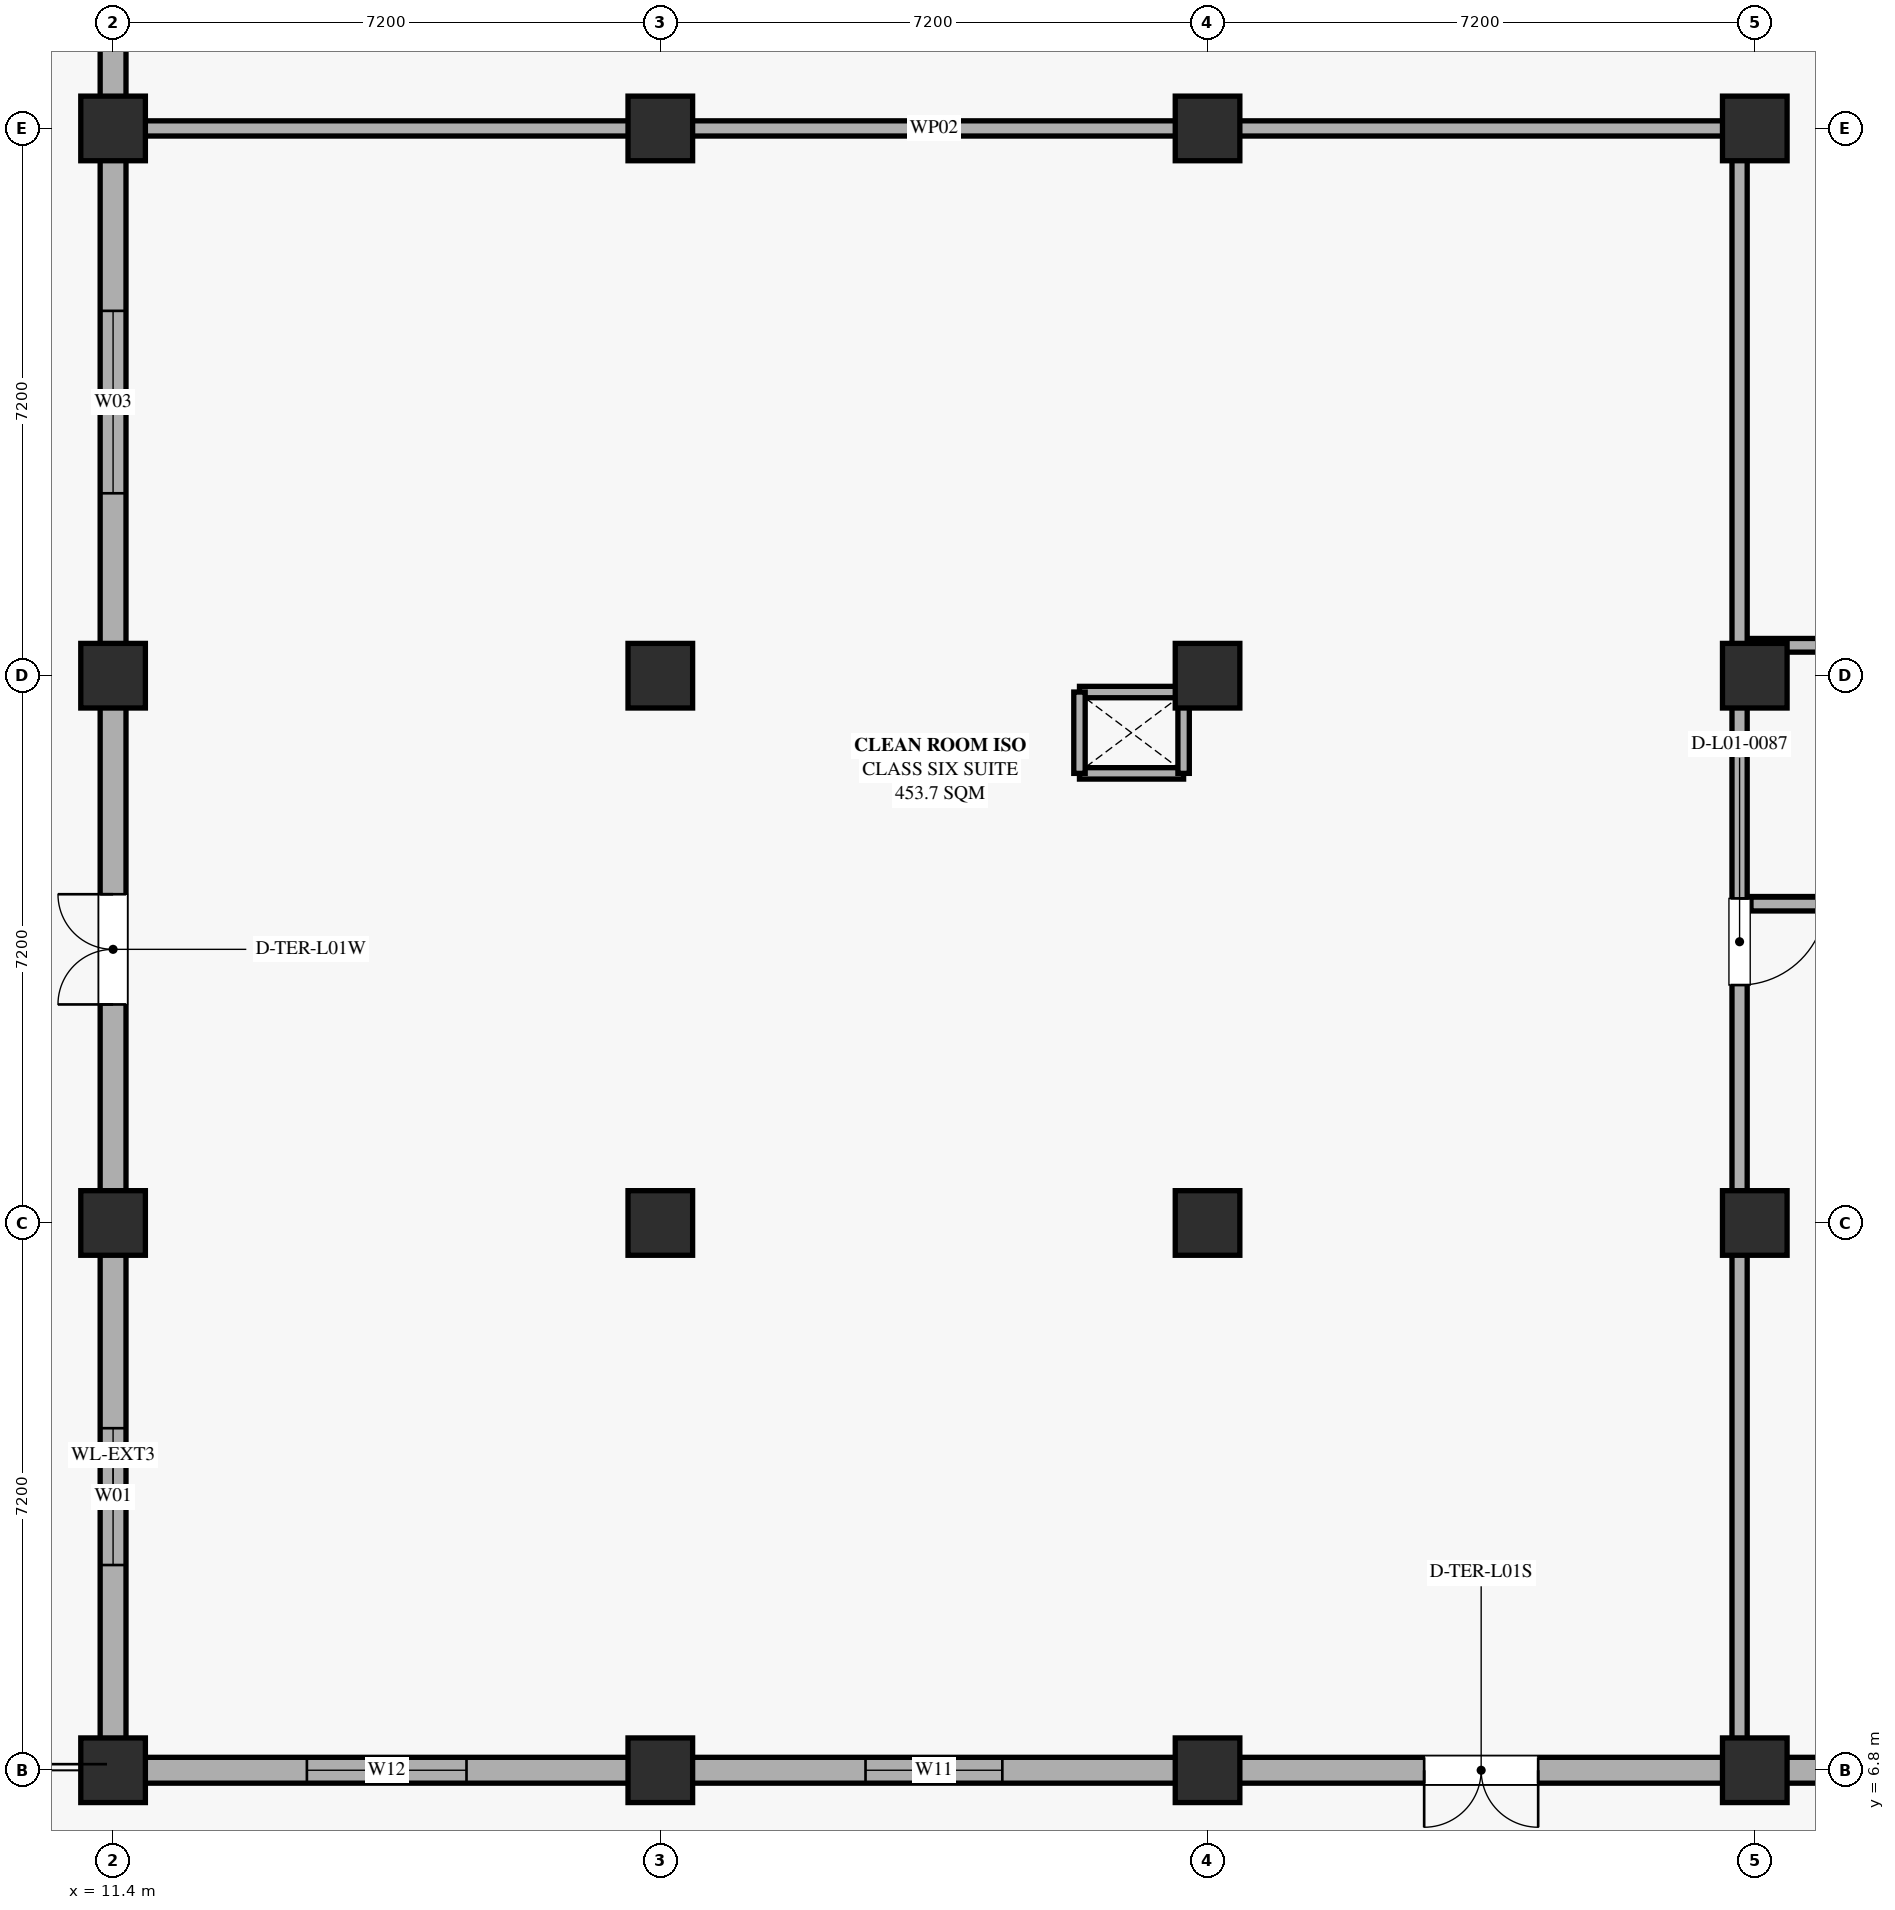
"""IFC4 building model, lengths in metres.
Left out: names, types, materials, properties, quantities, classifications, styles, units other than length and angle.
Written with IfcOpenShell. Run it as: python <this file> out.ifc"""

import sys

from ifc_helpers import new_model, si_unit, direction, frame, frame_2d, origin, origin_2d, place, context, subcontext, project, spatial, rectangle, extrude, element, fill, save


model = new_model("IFC4")
c1 = context("Model", 3, precision=1e-05, world=origin(), true_north=direction((0.0, 1.0)))
c2 = subcontext(c1, "Body", "Model", "MODEL_VIEW")
j1 = project(units=[si_unit("LENGTHUNIT", "METRE"), si_unit("PLANEANGLEUNIT", "RADIAN")], contexts=[c1])
p1 = place(None, origin())
s1 = spatial("IfcSite", under=j1, at=p1, CompositionType="ELEMENT")
p2 = place(p1, origin())
s2 = spatial("IfcBuilding", under=s1, at=p2, CompositionType="ELEMENT")
p3 = place(p2, frame((0.0, 0.0, 5.4)))
s3 = spatial("IfcBuildingStorey", under=s2, at=p3, CompositionType="ELEMENT", Elevation=5.4)
for number, where, z_axis, x_axis in (
    (1, (11.4, 6.8, 0.0), (0.0, 0.0, 1.0), (1.0, 0.0, 0.0)),
    (2, (18.6, 6.8, 0.0), (0.0, 0.0, 1.0), (1.0, 0.0, 0.0)),
    (3, (25.8, 6.8, 0.0), (0.0, 0.0, 1.0), (1.0, 0.0, 0.0)),
    (4, (33.0, 6.8, 0.0), (0.0, 0.0, 1.0), (1.0, 0.0, 0.0)),
    (5, (11.4, 14.0, 0.0), (0.0, 0.0, 1.0), (1.0, 0.0, 0.0)),
    (6, (18.6, 14.0, 0.0), (0.0, 0.0, 1.0), (1.0, 0.0, 0.0)),
    (7, (25.8, 14.0, 0.0), (0.0, 0.0, 1.0), (1.0, 0.0, 0.0)),
    (8, (33.0, 14.0, 0.0), (0.0, 0.0, 1.0), (1.0, 0.0, 0.0)),
    (9, (11.4, 21.2, 0.0), (0.0, 0.0, 1.0), (1.0, 0.0, 0.0)),
    (10, (18.6, 21.2, 0.0), (0.0, 0.0, 1.0), (1.0, 0.0, 0.0)),
    (11, (25.8, 21.2, 0.0), (0.0, 0.0, 1.0), (1.0, 0.0, 0.0)),
    (12, (33.0, 21.2, 0.0), (0.0, 0.0, 1.0), (1.0, 0.0, 0.0)),
    (13, (11.4, 28.4, 0.0), (0.0, 0.0, 1.0), (1.0, 0.0, 0.0)),
    (14, (18.6, 28.4, 0.0), (0.0, 0.0, 1.0), (1.0, 0.0, 0.0)),
    (15, (25.8, 28.4, 0.0), (0.0, 0.0, 1.0), (1.0, 0.0, 0.0)),
    (16, (33.0, 28.4, 0.0), (0.0, 0.0, 1.0), (1.0, 0.0, 0.0)),
):
    element("IfcColumn", number, at=place(p3, frame(where, z_axis=z_axis, x_axis=x_axis)), inside=s3, PredefinedType="COLUMN", context=c2, shape_type="SweptSolid", body=[
        extrude(rectangle(XDim=0.85, YDim=0.85, at=origin_2d()), origin(), (0.0, 0.0, 1.0), 5.04),
    ])
p4 = place(p3, frame((11.4, 7.21, 0.0), z_axis=(0.0, 0.0, 1.0), x_axis=(0.0, 1.0, 0.0)))
e17 = element("IfcWall", 17, at=p4, inside=s3, PredefinedType="SOLIDWALL", context=c2, shape_type="SweptSolid", body=[
    extrude(rectangle(XDim=6.38, YDim=0.34, at=frame_2d((3.19, 0.0))), origin(), (0.0, 0.0, 1.0), 3.54),
])
p5 = place(p4, frame((2.29, 0.0, 0.9)))
e18 = element("IfcOpeningElement", 18, at=p5, cuts=e17, PredefinedType="OPENING", context=c2, shape_type="SweptSolid", body=[
    extrude(rectangle(XDim=1.8, YDim=2.4, at=frame_2d((0.9, 1.2))), frame((0.0, 0.18, 0.0), z_axis=(0.0, -1.0, 0.0), x_axis=(1.0, 0.0, 0.0)), (0.0, 0.0, 1.0), 0.36),
])
p6 = place(p3, frame((11.4, 14.41, 0.0), z_axis=(0.0, 0.0, 1.0), x_axis=(0.0, 1.0, 0.0)))
e19 = element("IfcWall", 19, at=p6, inside=s3, PredefinedType="SOLIDWALL", context=c2, shape_type="SweptSolid", body=[
    extrude(rectangle(XDim=6.38, YDim=0.34, at=frame_2d((3.19, 0.0))), origin(), (0.0, 0.0, 1.0), 3.54),
])
p7 = place(p6, frame((2.465, 0.0, 0.0)))
e20 = element("IfcOpeningElement", 20, at=p7, cuts=e19, PredefinedType="OPENING", context=c2, shape_type="SweptSolid", body=[
    extrude(rectangle(XDim=1.45, YDim=2.2, at=frame_2d((0.725, 1.1))), frame((0.0, 0.18, 0.0), z_axis=(0.0, -1.0, 0.0), x_axis=(1.0, 0.0, 0.0)), (0.0, 0.0, 1.0), 0.36),
])
p8 = place(p3, frame((11.4, 21.61, 0.0), z_axis=(0.0, 0.0, 1.0), x_axis=(0.0, 1.0, 0.0)))
e21 = element("IfcWall", 21, at=p8, inside=s3, PredefinedType="SOLIDWALL", context=c2, shape_type="SweptSolid", body=[
    extrude(rectangle(XDim=6.38, YDim=0.34, at=frame_2d((3.19, 0.0))), origin(), (0.0, 0.0, 1.0), 3.54),
])
p9 = place(p8, frame((1.99, 0.0, 0.9)))
e22 = element("IfcOpeningElement", 22, at=p9, cuts=e21, PredefinedType="OPENING", context=c2, shape_type="SweptSolid", body=[
    extrude(rectangle(XDim=2.4, YDim=2.4, at=frame_2d((1.2, 1.2))), frame((0.0, 0.18, 0.0), z_axis=(0.0, -1.0, 0.0), x_axis=(1.0, 0.0, 0.0)), (0.0, 0.0, 1.0), 0.36),
])
p10 = place(p3, frame((11.4, 28.81, 0.0), z_axis=(0.0, 0.0, 1.0), x_axis=(0.0, 1.0, 0.0)))
e23 = element("IfcWall", 23, at=p10, inside=s3, PredefinedType="SOLIDWALL", context=c2, shape_type="SweptSolid", body=[
    extrude(rectangle(XDim=6.38, YDim=0.34, at=frame_2d((3.19, 0.0))), origin(), (0.0, 0.0, 1.0), 3.54),
])
p11 = place(p10, frame((2.44, 0.0, 0.9)))
e24 = element("IfcOpeningElement", 24, at=p11, cuts=e23, PredefinedType="OPENING", context=c2, shape_type="SweptSolid", body=[
    extrude(rectangle(XDim=1.5, YDim=2.4, at=frame_2d((0.75, 1.2))), frame((0.0, 0.18, 0.0), z_axis=(0.0, -1.0, 0.0), x_axis=(1.0, 0.0, 0.0)), (0.0, 0.0, 1.0), 0.36),
])
p12 = place(p3, frame((39.79, 6.8, 0.0), z_axis=(0.0, 0.0, 1.0), x_axis=(-1.0, 0.0, 0.0)))
e25 = element("IfcWall", 25, at=p12, inside=s3, PredefinedType="SOLIDWALL", context=c2, shape_type="SweptSolid", body=[
    extrude(rectangle(XDim=6.38, YDim=0.34, at=frame_2d((3.19, 0.0))), origin(), (0.0, 0.0, 1.0), 3.54),
])
p13 = place(p12, frame((2.44, 0.0, 0.9)))
e26 = element("IfcOpeningElement", 26, at=p13, cuts=e25, PredefinedType="OPENING", context=c2, shape_type="SweptSolid", body=[
    extrude(rectangle(XDim=1.5, YDim=2.1, at=frame_2d((0.75, 1.05))), frame((0.0, 0.18, 0.0), z_axis=(0.0, -1.0, 0.0), x_axis=(1.0, 0.0, 0.0)), (0.0, 0.0, 1.0), 0.36),
])
p14 = place(p3, frame((32.59, 6.8, 0.0), z_axis=(0.0, 0.0, 1.0), x_axis=(-1.0, 0.0, 0.0)))
e27 = element("IfcWall", 27, at=p14, inside=s3, PredefinedType="SOLIDWALL", context=c2, shape_type="SweptSolid", body=[
    extrude(rectangle(XDim=6.38, YDim=0.34, at=frame_2d((3.19, 0.0))), origin(), (0.0, 0.0, 1.0), 3.54),
])
p15 = place(p14, frame((2.44, 0.0, 0.0)))
e28 = element("IfcOpeningElement", 28, at=p15, cuts=e27, PredefinedType="OPENING", context=c2, shape_type="SweptSolid", body=[
    extrude(rectangle(XDim=1.5, YDim=2.2, at=frame_2d((0.75, 1.1))), frame((0.0, 0.18, 0.0), z_axis=(0.0, -1.0, 0.0), x_axis=(1.0, 0.0, 0.0)), (0.0, 0.0, 1.0), 0.36),
])
p16 = place(p3, frame((25.39, 6.8, 0.0), z_axis=(0.0, 0.0, 1.0), x_axis=(-1.0, 0.0, 0.0)))
e29 = element("IfcWall", 29, at=p16, inside=s3, PredefinedType="SOLIDWALL", context=c2, shape_type="SweptSolid", body=[
    extrude(rectangle(XDim=6.38, YDim=0.34, at=frame_2d((3.19, 0.0))), origin(), (0.0, 0.0, 1.0), 3.54),
])
p17 = place(p16, frame((2.29, 0.0, 0.9)))
e30 = element("IfcOpeningElement", 30, at=p17, cuts=e29, PredefinedType="OPENING", context=c2, shape_type="SweptSolid", body=[
    extrude(rectangle(XDim=1.8, YDim=1.8, at=frame_2d((0.9, 0.9))), frame((0.0, 0.18, 0.0), z_axis=(0.0, -1.0, 0.0), x_axis=(1.0, 0.0, 0.0)), (0.0, 0.0, 1.0), 0.36),
])
p18 = place(p3, frame((18.19, 6.8, 0.0), z_axis=(0.0, 0.0, 1.0), x_axis=(-1.0, 0.0, 0.0)))
e31 = element("IfcWall", 31, at=p18, inside=s3, PredefinedType="SOLIDWALL", context=c2, shape_type="SweptSolid", body=[
    extrude(rectangle(XDim=6.38, YDim=0.34, at=frame_2d((3.19, 0.0))), origin(), (0.0, 0.0, 1.0), 3.54),
])
p19 = place(p18, frame((2.14, 0.0, 0.9)))
e32 = element("IfcOpeningElement", 32, at=p19, cuts=e31, PredefinedType="OPENING", context=c2, shape_type="SweptSolid", body=[
    extrude(rectangle(XDim=2.1, YDim=1.8, at=frame_2d((1.05, 0.9))), frame((0.0, 0.18, 0.0), z_axis=(0.0, -1.0, 0.0), x_axis=(1.0, 0.0, 0.0)), (0.0, 0.0, 1.0), 0.36),
])
for number, where, z_axis, x_axis in (
    (33, (25.485, 19.915, 0.0), (0.0, 0.0, 1.0), (-1.0, 0.0, 0.0)),
    (34, (24.115, 20.985, 0.0), (0.0, 0.0, 1.0), (1.0, 0.0, 0.0)),
):
    element("IfcWall", number, at=place(p3, frame(where, z_axis=z_axis, x_axis=x_axis)), inside=s3, PredefinedType="PARTITIONING", context=c2, shape_type="SweptSolid", body=[
        extrude(rectangle(XDim=1.37, YDim=0.15, at=frame_2d((0.685, 0.0))), origin(), (0.0, 0.0, 1.0), 3.52),
    ])
for number, where, z_axis, x_axis in (
    (35, (24.115, 19.915, 0.0), (0.0, 0.0, 1.0), (0.0, 1.0, 0.0)),
    (36, (25.485, 20.985, 0.0), (0.0, 0.0, 1.0), (0.0, -1.0, 0.0)),
):
    element("IfcWall", number, at=place(p3, frame(where, z_axis=z_axis, x_axis=x_axis)), inside=s3, PredefinedType="PARTITIONING", context=c2, shape_type="SweptSolid", body=[
        extrude(rectangle(XDim=1.07, YDim=0.15, at=frame_2d((0.535, 0.0))), origin(), (0.0, 0.0, 1.0), 3.52),
    ])
p20 = place(p3, frame((11.75, 28.4, 0.0), z_axis=(0.0, 0.0, 1.0), x_axis=(1.0, 0.0, 0.0)))
e37 = element("IfcWall", 37, at=p20, inside=s3, PredefinedType="PARTITIONING", context=c2, shape_type="SweptSolid", body=[
    extrude(rectangle(XDim=20.9, YDim=0.2, at=frame_2d((10.45, 0.0))), origin(), (0.0, 0.0, 1.0), 3.52),
])
p21 = place(p3, frame((32.8, 28.25, 0.0), z_axis=(0.0, 0.0, 1.0), x_axis=(0.0, -1.0, 0.0)))
e38 = element("IfcWall", 38, at=p21, inside=s3, PredefinedType="PARTITIONING", context=c2, shape_type="SweptSolid", body=[
    extrude(rectangle(XDim=21.1, YDim=0.2, at=frame_2d((10.55, 0.0))), origin(), (0.0, 0.0, 1.0), 3.52),
])
p22 = place(p21, frame((9.98, 0.0, 0.0)))
e39 = element("IfcOpeningElement", 39, at=p22, cuts=e38, PredefinedType="OPENING", context=c2, shape_type="SweptSolid", body=[
    extrude(rectangle(XDim=1.14, YDim=2.12, at=frame_2d((0.57, 1.06))), frame((0.0, 0.11, 0.0), z_axis=(0.0, -1.0, 0.0), x_axis=(1.0, 0.0, 0.0)), (0.0, 0.0, 1.0), 0.22),
])
p23 = place(p3, frame((32.95, 18.2, 0.0), z_axis=(0.0, 0.0, 1.0), x_axis=(1.0, 0.0, 0.0)))
e40 = element("IfcWall", 40, at=p23, inside=s3, PredefinedType="PARTITIONING", context=c2, shape_type="SweptSolid", body=[
    extrude(rectangle(XDim=21.7, YDim=0.19, at=frame_2d((10.85, 0.0))), origin(), (0.0, 0.0, 1.0), 3.52),
])
p24 = place(p23, frame((10.28, 0.0, 0.0)))
e41 = element("IfcOpeningElement", 41, at=p24, cuts=e40, PredefinedType="OPENING", context=c2, shape_type="SweptSolid", body=[
    extrude(rectangle(XDim=1.14, YDim=2.18, at=frame_2d((0.57, 1.09))), frame((0.0, 0.105, 0.0), z_axis=(0.0, -1.0, 0.0), x_axis=(1.0, 0.0, 0.0)), (0.0, 0.0, 1.0), 0.21),
])
p25 = place(p3, frame((54.65, 21.6, 0.0), z_axis=(0.0, 0.0, 1.0), x_axis=(-1.0, 0.0, 0.0)))
e42 = element("IfcWall", 42, at=p25, inside=s3, PredefinedType="PARTITIONING", context=c2, shape_type="SweptSolid", body=[
    extrude(rectangle(XDim=21.7, YDim=0.18, at=frame_2d((10.85, 0.0))), origin(), (0.0, 0.0, 1.0), 3.52),
])
p26 = place(p25, frame((10.26, 0.0, 0.0)))
e43 = element("IfcOpeningElement", 43, at=p26, cuts=e42, PredefinedType="OPENING", context=c2, shape_type="SweptSolid", body=[
    extrude(rectangle(XDim=1.18, YDim=2.06, at=frame_2d((0.59, 1.03))), frame((0.0, 0.1, 0.0), z_axis=(0.0, -1.0, 0.0), x_axis=(1.0, 0.0, 0.0)), (0.0, 0.0, 1.0), 0.2),
])
p27 = place(p5, origin())
e44 = element("IfcWindow", 44, at=p27, inside=s3, PartitioningType="DOUBLE_PANEL_VERTICAL", PredefinedType="WINDOW", context=c2, shape_type="SweptSolid", body=[
    extrude(rectangle(XDim=1.8, YDim=2.4, at=frame_2d((0.9, 1.2))), frame((0.0, 0.03, 0.0), z_axis=(0.0, -1.0, 0.0), x_axis=(1.0, 0.0, 0.0)), (0.0, 0.0, 1.0), 0.06),
])
fill(e18, e44)
p28 = place(p7, origin())
e45 = element("IfcDoor", 45, at=p28, inside=s3, OperationType="DOUBLE_DOOR_SINGLE_SWING", PredefinedType="DOOR", context=c2, shape_type="SweptSolid", body=[
    extrude(rectangle(XDim=1.45, YDim=2.2, at=frame_2d((0.725, 1.1))), frame((0.0, 0.025, 0.0), z_axis=(0.0, -1.0, 0.0), x_axis=(1.0, 0.0, 0.0)), (0.0, 0.0, 1.0), 0.05),
])
fill(e20, e45)
p29 = place(p9, origin())
e46 = element("IfcWindow", 46, at=p29, inside=s3, PartitioningType="DOUBLE_PANEL_VERTICAL", PredefinedType="WINDOW", context=c2, shape_type="SweptSolid", body=[
    extrude(rectangle(XDim=2.4, YDim=2.4, at=frame_2d((1.2, 1.2))), frame((0.0, 0.03, 0.0), z_axis=(0.0, -1.0, 0.0), x_axis=(1.0, 0.0, 0.0)), (0.0, 0.0, 1.0), 0.06),
])
fill(e22, e46)
p30 = place(p15, origin())
e47 = element("IfcDoor", 47, at=p30, inside=s3, OperationType="DOUBLE_DOOR_SINGLE_SWING", PredefinedType="DOOR", context=c2, shape_type="SweptSolid", body=[
    extrude(rectangle(XDim=1.5, YDim=2.2, at=frame_2d((0.75, 1.1))), frame((0.0, 0.025, 0.0), z_axis=(0.0, -1.0, 0.0), x_axis=(1.0, 0.0, 0.0)), (0.0, 0.0, 1.0), 0.05),
])
fill(e28, e47)
p31 = place(p17, origin())
e48 = element("IfcWindow", 48, at=p31, inside=s3, PartitioningType="DOUBLE_PANEL_VERTICAL", PredefinedType="WINDOW", context=c2, shape_type="SweptSolid", body=[
    extrude(rectangle(XDim=1.8, YDim=1.8, at=frame_2d((0.9, 0.9))), frame((0.0, 0.03, 0.0), z_axis=(0.0, -1.0, 0.0), x_axis=(1.0, 0.0, 0.0)), (0.0, 0.0, 1.0), 0.06),
])
fill(e30, e48)
p32 = place(p19, origin())
e49 = element("IfcWindow", 49, at=p32, inside=s3, PartitioningType="DOUBLE_PANEL_VERTICAL", PredefinedType="WINDOW", context=c2, shape_type="SweptSolid", body=[
    extrude(rectangle(XDim=2.1, YDim=1.8, at=frame_2d((1.05, 0.9))), frame((0.0, 0.03, 0.0), z_axis=(0.0, -1.0, 0.0), x_axis=(1.0, 0.0, 0.0)), (0.0, 0.0, 1.0), 0.06),
])
fill(e32, e49)
p33 = place(p22, origin())
e50 = element("IfcDoor", 50, at=p33, inside=s3, OperationType="SINGLE_SWING_LEFT", PredefinedType="DOOR", context=c2, shape_type="SweptSolid", body=[
    extrude(rectangle(XDim=1.14, YDim=2.12, at=frame_2d((0.57, 1.06))), frame((0.0, 0.025, 0.0), z_axis=(0.0, -1.0, 0.0), x_axis=(1.0, 0.0, 0.0)), (0.0, 0.0, 1.0), 0.05),
])
fill(e39, e50)
save(model, sys.argv[1])
